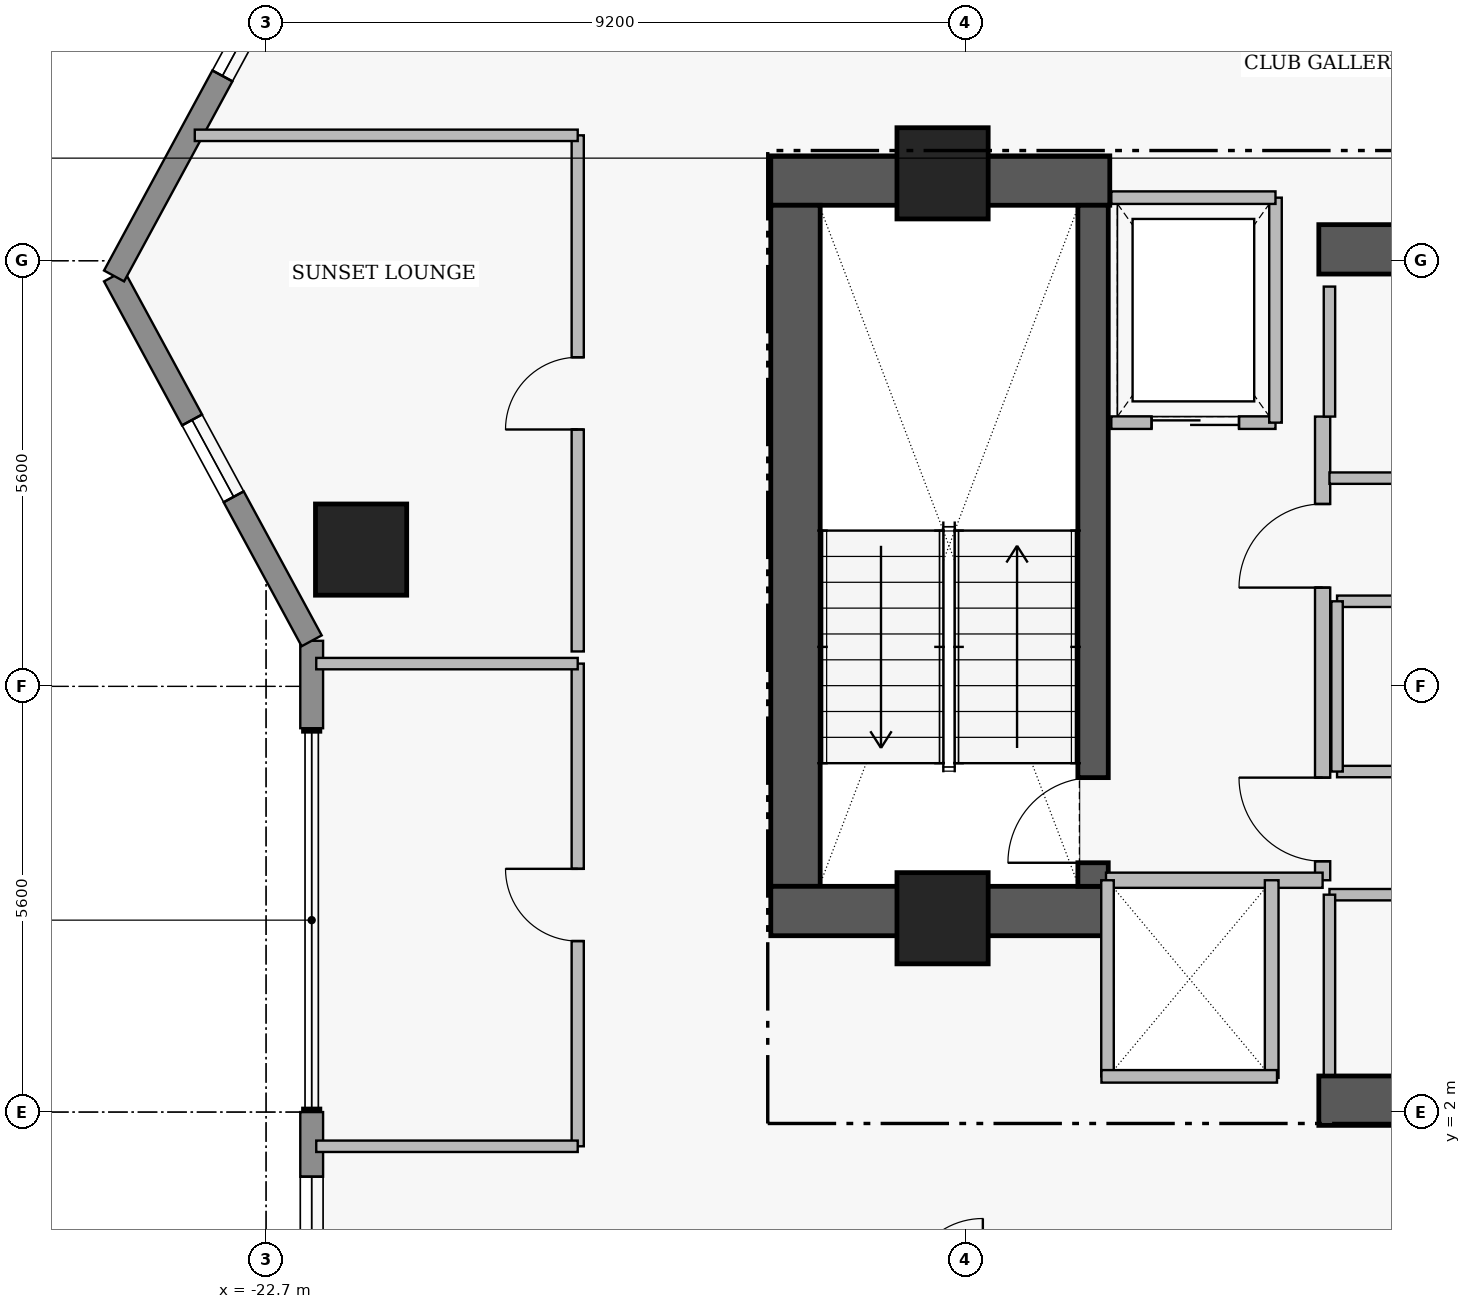
"""IFC4 building model, lengths in metres.
Left out: names, types, materials, properties, quantities, classifications, styles, units other than length and angle.
Written with IfcOpenShell. Run it as: python <this file> out.ifc"""

import sys

from ifc_helpers import new_model, si_unit, direction, frame, frame_2d, origin, origin_2d, place, context, subcontext, project, spatial, rectangle, extrude, element, fill, save


model = new_model("IFC4")
c1 = context("Model", 3, precision=1e-05, world=origin(), true_north=direction((0.0, 1.0)))
c2 = subcontext(c1, "Body", "Model", "MODEL_VIEW")
j1 = project(units=[si_unit("LENGTHUNIT", "METRE"), si_unit("PLANEANGLEUNIT", "RADIAN")], contexts=[c1])
p1 = place(None, origin())
s1 = spatial("IfcSite", under=j1, at=p1, CompositionType="ELEMENT")
p2 = place(p1, origin())
s2 = spatial("IfcBuilding", under=s1, at=p2, CompositionType="ELEMENT")
p3 = place(p2, frame((0.0, 0.0, 199.9)))
s3 = spatial("IfcBuildingStorey", under=s2, at=p3, CompositionType="ELEMENT", Elevation=199.9)
p4 = place(p3, frame((-16.06, 14.255, 0.0), z_axis=(0.0, 0.0, 1.0), x_axis=(1.0, 0.0, 0.0)))
e1 = element("IfcWall", 1, at=p4, inside=s3, PredefinedType="SHEAR", context=c2, shape_type="SweptSolid", body=[
    extrude(rectangle(XDim=4.46, YDim=0.65, at=frame_2d((2.23, 0.0))), origin(), (0.0, 0.0, 1.0), 3.56),
])
p5 = place(p3, frame((-15.735, 4.97, 0.0), z_axis=(0.0, 0.0, 1.0), x_axis=(0.0, 1.0, 0.0)))
e2 = element("IfcWall", 2, at=p5, inside=s3, PredefinedType="SHEAR", context=c2, shape_type="SweptSolid", body=[
    extrude(rectangle(XDim=8.96, YDim=0.65, at=frame_2d((4.48, 0.0))), origin(), (0.0, 0.0, 1.0), 3.56),
])
p6 = place(p3, frame((-16.06, 4.645, 0.0), z_axis=(0.0, 0.0, 1.0), x_axis=(1.0, 0.0, 0.0)))
e3 = element("IfcWall", 3, at=p6, inside=s3, PredefinedType="SHEAR", context=c2, shape_type="SweptSolid", body=[
    extrude(rectangle(XDim=4.46, YDim=0.65, at=frame_2d((2.23, 0.0))), origin(), (0.0, 0.0, 1.0), 3.56),
])
for number, where, z_axis, x_axis in (
    (4, (-8.85, 2.15, 0.0), (0.0, 0.0, 1.0), (1.0, 0.0, 0.0)),
    (5, (-8.85, 13.35, 0.0), (0.0, 0.0, 1.0), (1.0, 0.0, 0.0)),
):
    element("IfcWall", number, at=place(p3, frame(where, z_axis=z_axis, x_axis=x_axis)), inside=s3, PredefinedType="SHEAR", context=c2, shape_type="SweptSolid", body=[
        extrude(rectangle(XDim=7.6, YDim=0.65, at=frame_2d((3.8, 0.0))), origin(), (0.0, 0.0, 1.0), 3.53),
    ])
p7 = place(p3, frame((-11.82, 4.97, 0.0), z_axis=(0.0, 0.0, 1.0), x_axis=(0.0, 1.0, 0.0)))
e6 = element("IfcWall", 6, at=p7, inside=s3, PredefinedType="SHEAR", context=c2, shape_type="SweptSolid", body=[
    extrude(rectangle(XDim=8.96, YDim=0.4, at=frame_2d((4.48, 0.0))), origin(), (0.0, 0.0, 1.0), 3.56),
])
p8 = place(p7, frame((0.31, 0.0, 0.0)))
e7 = element("IfcOpeningElement", 7, at=p8, cuts=e6, PredefinedType="OPENING", context=c2, shape_type="SweptSolid", body=[
    extrude(rectangle(XDim=1.12, YDim=2.22, at=frame_2d((0.56, 1.11))), frame((0.0, 0.21, 0.0), z_axis=(0.0, -1.0, 0.0), x_axis=(1.0, 0.0, 0.0)), (0.0, 0.0, 1.0), 0.42),
])
for number, where, z_axis, x_axis in (
    (8, (-13.8, 14.35, 0.0), (0.0, 0.0, 1.0), (1.0, 0.0, 0.0)),
    (9, (-13.8, 4.55, 0.0), (0.0, 0.0, 1.0), (1.0, 0.0, 0.0)),
    (10, (-21.45, 9.4, 0.0), (0.0, 0.0, 1.0), (1.0, 0.0, 0.0)),
):
    element("IfcColumn", number, at=place(p3, frame(where, z_axis=z_axis, x_axis=x_axis)), inside=s3, PredefinedType="COLUMN", context=c2, shape_type="SweptSolid", body=[
        extrude(rectangle(XDim=1.2, YDim=1.2, at=origin_2d()), origin(), (0.0, 0.0, 1.0), 3.75),
    ])
p9 = place(p3, frame((-22.1, -4.2, 0.0), z_axis=(0.0, 0.0, 1.0), x_axis=(0.0, 1.0, 0.0)))
e11 = element("IfcWall", 11, at=p9, inside=s3, PredefinedType="STANDARD", context=c2, shape_type="SweptSolid", body=[
    extrude(rectangle(XDim=6.2, YDim=0.3, at=frame_2d((3.1, 0.0))), origin(), (0.0, 0.0, 1.0), 3.53),
])
p10 = place(p9, frame((2.045, 0.0, 0.95)))
e12 = element("IfcOpeningElement", 12, at=p10, cuts=e11, PredefinedType="OPENING", context=c2, shape_type="SweptSolid", body=[
    extrude(rectangle(XDim=1.15, YDim=1.55, at=frame_2d((0.575, 0.775))), frame((0.0, 0.16, 0.0), z_axis=(0.0, -1.0, 0.0), x_axis=(1.0, 0.0, 0.0)), (0.0, 0.0, 1.0), 0.32),
])
p11 = place(p9, frame((4.2, 0.0, 0.95)))
e13 = element("IfcOpeningElement", 13, at=p11, cuts=e11, PredefinedType="OPENING", context=c2, shape_type="SweptSolid", body=[
    extrude(rectangle(XDim=1.15, YDim=1.55, at=frame_2d((0.575, 0.775))), frame((0.0, 0.16, 0.0), z_axis=(0.0, -1.0, 0.0), x_axis=(1.0, 0.0, 0.0)), (0.0, 0.0, 1.0), 0.32),
])
p12 = place(p3, frame((-22.1, 7.05, 0.0), z_axis=(0.0, 0.0, 1.0), x_axis=(0.0, 1.0, 0.0)))
e14 = element("IfcWall", 14, at=p12, inside=s3, PredefinedType="STANDARD", context=c2, shape_type="SweptSolid", body=[
    extrude(rectangle(XDim=1.15, YDim=0.3, at=frame_2d((0.575, 0.0))), origin(), (0.0, 0.0, 1.0), 3.53),
])
p13 = place(p3, frame((-22.1, 8.2, 0.0), z_axis=(0.0, 0.0, 1.0), x_axis=(-0.476258655584, 0.879305233114, 0.0)))
e15 = element("IfcWall", 15, at=p13, inside=s3, PredefinedType="STANDARD", context=c2, shape_type="SweptSolid", body=[
    extrude(rectangle(XDim=5.459, YDim=0.3, at=frame_2d((2.729, 0.0))), origin(), (0.0, 0.0, 1.0), 3.53),
])
p14 = place(p13, frame((2.155, 0.0, 1.25)))
e16 = element("IfcOpeningElement", 16, at=p14, cuts=e15, PredefinedType="OPENING", context=c2, shape_type="SweptSolid", body=[
    extrude(rectangle(XDim=1.15, YDim=1.55, at=frame_2d((0.575, 0.775))), frame((0.0, 0.16, 0.0), z_axis=(0.0, -1.0, 0.0), x_axis=(1.0, 0.0, 0.0)), (0.0, 0.0, 1.0), 0.32),
])
p15 = place(p3, frame((-24.7, 13.0, 0.0), z_axis=(0.0, 0.0, 1.0), x_axis=(0.476258655584, 0.879305233114, 0.0)))
e17 = element("IfcWall", 17, at=p15, inside=s3, PredefinedType="STANDARD", context=c2, shape_type="SweptSolid", body=[
    extrude(rectangle(XDim=5.459, YDim=0.3, at=frame_2d((2.729, 0.0))), origin(), (0.0, 0.0, 1.0), 3.53),
])
p16 = place(p15, frame((2.993, 0.0, 1.25)))
e18 = element("IfcOpeningElement", 18, at=p16, cuts=e17, PredefinedType="OPENING", context=c2, shape_type="SweptSolid", body=[
    extrude(rectangle(XDim=1.15, YDim=1.55, at=frame_2d((0.575, 0.775))), frame((0.0, 0.16, 0.0), z_axis=(0.0, -1.0, 0.0), x_axis=(1.0, 0.0, 0.0)), (0.0, 0.0, 1.0), 0.32),
])
p17 = place(p3, frame((-8.8, 5.05, 0.0), z_axis=(0.0, 0.0, 1.0), x_axis=(0.0, 1.0, 0.0)))
e19 = element("IfcWall", 19, at=p17, inside=s3, PredefinedType="PARTITIONING", context=c2, shape_type="SweptSolid", body=[
    extrude(rectangle(XDim=6.1, YDim=0.2, at=frame_2d((3.05, 0.0))), origin(), (0.0, 0.0, 1.0), 3.53),
])
p18 = place(p17, frame((0.25, 0.0, 0.0)))
e20 = element("IfcOpeningElement", 20, at=p18, cuts=e19, PredefinedType="OPENING", context=c2, shape_type="SweptSolid", body=[
    extrude(rectangle(XDim=1.1, YDim=2.2, at=frame_2d((0.55, 1.1))), frame((0.0, 0.11, 0.0), z_axis=(0.0, -1.0, 0.0), x_axis=(1.0, 0.0, 0.0)), (0.0, 0.0, 1.0), 0.22),
])
p19 = place(p17, frame((3.85, 0.0, 0.0)))
e21 = element("IfcOpeningElement", 21, at=p19, cuts=e19, PredefinedType="OPENING", context=c2, shape_type="SweptSolid", body=[
    extrude(rectangle(XDim=1.1, YDim=2.2, at=frame_2d((0.55, 1.1))), frame((0.0, 0.11, 0.0), z_axis=(0.0, -1.0, 0.0), x_axis=(1.0, 0.0, 0.0)), (0.0, 0.0, 1.0), 0.22),
])
p20 = place(p3, frame((-11.58, 11.07, 0.0), z_axis=(0.0, 0.0, 1.0), x_axis=(1.0, 0.0, 0.0)))
e22 = element("IfcWall", 22, at=p20, inside=s3, PredefinedType="PARTITIONING", context=c2, shape_type="SweptSolid", body=[
    extrude(rectangle(XDim=2.16, YDim=0.165, at=frame_2d((1.08, 0.0))), origin(), (0.0, 0.0, 1.0), 3.53),
])
p21 = place(p20, frame((0.53, 0.0, 0.0)))
e23 = element("IfcOpeningElement", 23, at=p21, cuts=e22, PredefinedType="OPENING", context=c2, shape_type="SweptSolid", body=[
    extrude(rectangle(XDim=1.15, YDim=2.25, at=frame_2d((0.575, 1.125))), frame((0.0, 0.093, 0.0), z_axis=(0.0, -1.0, 0.0), x_axis=(1.0, 0.0, 0.0)), (0.0, 0.0, 1.0), 0.185),
])
p22 = place(p3, frame((-8.71, 4.86, 0.0), z_axis=(0.0, 0.0, 1.0), x_axis=(1.0, 0.0, 0.0)))
e24 = element("IfcWall", 24, at=p22, inside=s3, PredefinedType="PARTITIONING", context=c2, shape_type="SweptSolid", body=[
    extrude(rectangle(XDim=4.92, YDim=0.15, at=frame_2d((2.46, 0.0))), origin(), (0.0, 0.0, 1.0), 3.53),
])
p23 = place(p22, frame((2.01, 0.0, 0.0)))
e25 = element("IfcOpeningElement", 25, at=p23, cuts=e24, PredefinedType="OPENING", context=c2, shape_type="SweptSolid", body=[
    extrude(rectangle(XDim=0.9, YDim=2.15, at=frame_2d((0.45, 1.075))), frame((0.0, 0.085, 0.0), z_axis=(0.0, -1.0, 0.0), x_axis=(1.0, 0.0, 0.0)), (0.0, 0.0, 1.0), 0.17),
])
p24 = place(p3, frame((-8.71, 10.34, 0.0), z_axis=(0.0, 0.0, 1.0), x_axis=(1.0, 0.0, 0.0)))
e26 = element("IfcWall", 26, at=p24, inside=s3, PredefinedType="PARTITIONING", context=c2, shape_type="SweptSolid", body=[
    extrude(rectangle(XDim=4.52, YDim=0.15, at=frame_2d((2.26, 0.0))), origin(), (0.0, 0.0, 1.0), 3.53),
])
p25 = place(p24, frame((1.81, 0.0, 0.0)))
e27 = element("IfcOpeningElement", 27, at=p25, cuts=e26, PredefinedType="OPENING", context=c2, shape_type="SweptSolid", body=[
    extrude(rectangle(XDim=0.9, YDim=2.15, at=frame_2d((0.45, 1.075))), frame((0.0, 0.085, 0.0), z_axis=(0.0, -1.0, 0.0), x_axis=(1.0, 0.0, 0.0)), (0.0, 0.0, 1.0), 0.17),
])
p26 = place(p3, frame((-8.61, 6.48, 0.0), z_axis=(0.0, 0.0, 1.0), x_axis=(1.0, 0.0, 0.0)))
e28 = element("IfcWall", 28, at=p26, inside=s3, PredefinedType="PARTITIONING", context=c2, shape_type="SweptSolid", body=[
    extrude(rectangle(XDim=7.29, YDim=0.15, at=frame_2d((3.645, 0.0))), origin(), (0.0, 0.0, 1.0), 3.53),
])
p27 = place(p26, frame((3.195, 0.0, 0.0)))
e29 = element("IfcOpeningElement", 29, at=p27, cuts=e28, PredefinedType="OPENING", context=c2, shape_type="SweptSolid", body=[
    extrude(rectangle(XDim=0.9, YDim=2.15, at=frame_2d((0.45, 1.075))), frame((0.0, 0.085, 0.0), z_axis=(0.0, -1.0, 0.0), x_axis=(1.0, 0.0, 0.0)), (0.0, 0.0, 1.0), 0.17),
])
p28 = place(p3, frame((-18.6, 1.55, 0.0), z_axis=(0.0, 0.0, 1.0), x_axis=(0.0, 1.0, 0.0)))
e30 = element("IfcWall", 30, at=p28, inside=s3, PredefinedType="PARTITIONING", context=c2, shape_type="SweptSolid", body=[
    extrude(rectangle(XDim=6.35, YDim=0.16, at=frame_2d((3.175, 0.0))), origin(), (0.0, 0.0, 1.0), 3.53),
])
p29 = place(p28, frame((2.7, 0.0, 0.0)))
e31 = element("IfcOpeningElement", 31, at=p29, cuts=e30, PredefinedType="OPENING", context=c2, shape_type="SweptSolid", body=[
    extrude(rectangle(XDim=0.95, YDim=2.15, at=frame_2d((0.475, 1.075))), frame((0.0, 0.09, 0.0), z_axis=(0.0, -1.0, 0.0), x_axis=(1.0, 0.0, 0.0)), (0.0, 0.0, 1.0), 0.18),
])
p30 = place(p3, frame((-18.6, 8.06, 0.0), z_axis=(0.0, 0.0, 1.0), x_axis=(0.0, 1.0, 0.0)))
e32 = element("IfcWall", 32, at=p30, inside=s3, PredefinedType="PARTITIONING", context=c2, shape_type="SweptSolid", body=[
    extrude(rectangle(XDim=6.79, YDim=0.16, at=frame_2d((3.395, 0.0))), origin(), (0.0, 0.0, 1.0), 3.53),
])
p31 = place(p30, frame((2.92, 0.0, 0.0)))
e33 = element("IfcOpeningElement", 33, at=p31, cuts=e32, PredefinedType="OPENING", context=c2, shape_type="SweptSolid", body=[
    extrude(rectangle(XDim=0.95, YDim=2.15, at=frame_2d((0.475, 1.075))), frame((0.0, 0.09, 0.0), z_axis=(0.0, -1.0, 0.0), x_axis=(1.0, 0.0, 0.0)), (0.0, 0.0, 1.0), 0.18),
])
p32 = place(p3, frame((-11.65, 5.05, 0.0), z_axis=(0.0, 0.0, 1.0), x_axis=(1.0, 0.0, 0.0)))
e34 = element("IfcWall", 34, at=p32, inside=s3, PredefinedType="PARTITIONING", context=c2, shape_type="SweptSolid", body=[
    extrude(rectangle(XDim=2.85, YDim=0.2, at=frame_2d((1.425, 0.0))), origin(), (0.0, 0.0, 1.0), 3.53),
])
p33 = place(p3, frame((-9.42, 11.07, 0.0), z_axis=(0.0, 0.0, 1.0), x_axis=(0.0, 1.0, 0.0)))
e35 = element("IfcWall", 35, at=p33, inside=s3, PredefinedType="PARTITIONING", context=c2, shape_type="SweptSolid", body=[
    extrude(rectangle(XDim=2.96, YDim=0.165, at=frame_2d((1.48, 0.0))), origin(), (0.0, 0.0, 1.0), 3.53),
])
p34 = place(p3, frame((-11.58, 14.03, 0.0), z_axis=(0.0, 0.0, 1.0), x_axis=(1.0, 0.0, 0.0)))
e36 = element("IfcWall", 36, at=p34, inside=s3, PredefinedType="PARTITIONING", context=c2, shape_type="SweptSolid", body=[
    extrude(rectangle(XDim=2.16, YDim=0.165, at=frame_2d((1.08, 0.0))), origin(), (0.0, 0.0, 1.0), 3.53),
])
p35 = place(p3, frame((-8.71, 2.49, 0.0), z_axis=(0.0, 0.0, 1.0), x_axis=(0.0, 1.0, 0.0)))
e37 = element("IfcWall", 37, at=p35, inside=s3, PredefinedType="PARTITIONING", context=c2, shape_type="SweptSolid", body=[
    extrude(rectangle(XDim=2.37, YDim=0.15, at=frame_2d((1.185, 0.0))), origin(), (0.0, 0.0, 1.0), 3.53),
])
p36 = place(p3, frame((-8.71, 11.15, 0.0), z_axis=(0.0, 0.0, 1.0), x_axis=(0.0, 1.0, 0.0)))
e38 = element("IfcWall", 38, at=p36, inside=s3, PredefinedType="PARTITIONING", context=c2, shape_type="SweptSolid", body=[
    extrude(rectangle(XDim=1.71, YDim=0.15, at=frame_2d((0.855, 0.0))), origin(), (0.0, 0.0, 1.0), 3.53),
])
p37 = place(p3, frame((-9.47, 2.45, 0.0), z_axis=(0.0, 0.0, 1.0), x_axis=(0.0, 1.0, 0.0)))
e39 = element("IfcWall", 39, at=p37, inside=s3, PredefinedType="PARTITIONING", context=c2, shape_type="SweptSolid", body=[
    extrude(rectangle(XDim=2.6, YDim=0.18, at=frame_2d((1.3, 0.0))), origin(), (0.0, 0.0, 1.0), 3.53),
])
p38 = place(p3, frame((-11.63, 2.47, 0.0), z_axis=(0.0, 0.0, 1.0), x_axis=(0.0, 1.0, 0.0)))
e40 = element("IfcWall", 40, at=p38, inside=s3, PredefinedType="PARTITIONING", context=c2, shape_type="SweptSolid", body=[
    extrude(rectangle(XDim=2.58, YDim=0.165, at=frame_2d((1.29, 0.0))), origin(), (0.0, 0.0, 1.0), 3.53),
])
p39 = place(p3, frame((-11.71, 2.47, 0.0), z_axis=(0.0, 0.0, 1.0), x_axis=(1.0, 0.0, 0.0)))
e41 = element("IfcWall", 41, at=p39, inside=s3, PredefinedType="PARTITIONING", context=c2, shape_type="SweptSolid", body=[
    extrude(rectangle(XDim=2.31, YDim=0.165, at=frame_2d((1.155, 0.0))), origin(), (0.0, 0.0, 1.0), 2.43),
])
p40 = place(p3, frame((-8.61, 8.72, 0.0), z_axis=(0.0, 0.0, 1.0), x_axis=(1.0, 0.0, 0.0)))
e42 = element("IfcWall", 42, at=p40, inside=s3, PredefinedType="PARTITIONING", context=c2, shape_type="SweptSolid", body=[
    extrude(rectangle(XDim=7.29, YDim=0.15, at=frame_2d((3.645, 0.0))), origin(), (0.0, 0.0, 1.0), 3.53),
])
p41 = place(p3, frame((-8.61, 6.48, 0.0), z_axis=(0.0, 0.0, 1.0), x_axis=(0.0, 1.0, 0.0)))
e43 = element("IfcWall", 43, at=p41, inside=s3, PredefinedType="PARTITIONING", context=c2, shape_type="SweptSolid", body=[
    extrude(rectangle(XDim=2.24, YDim=0.15, at=frame_2d((1.12, 0.0))), origin(), (0.0, 0.0, 1.0), 3.53),
])
for number, where, z_axis, x_axis in (
    (44, (-22.04, 1.55, 0.0), (0.0, 0.0, 1.0), (1.0, 0.0, 0.0)),
    (45, (-22.04, 7.9, 0.0), (0.0, 0.0, 1.0), (1.0, 0.0, 0.0)),
):
    element("IfcWall", number, at=place(p3, frame(where, z_axis=z_axis, x_axis=x_axis)), inside=s3, PredefinedType="PARTITIONING", context=c2, shape_type="SweptSolid", body=[
        extrude(rectangle(XDim=3.44, YDim=0.15, at=frame_2d((1.72, 0.0))), origin(), (0.0, 0.0, 1.0), 3.53),
    ])
p42 = place(p3, frame((-23.638, 14.85, 0.0), z_axis=(0.0, 0.0, 1.0), x_axis=(1.0, 0.0, 0.0)))
e46 = element("IfcWall", 46, at=p42, inside=s3, PredefinedType="PARTITIONING", context=c2, shape_type="SweptSolid", body=[
    extrude(rectangle(XDim=5.038, YDim=0.15, at=frame_2d((2.519, 0.0))), origin(), (0.0, 0.0, 1.0), 3.53),
])
p43 = place(p11, origin())
e47 = element("IfcWindow", 47, at=p43, inside=s3, PartitioningType="SINGLE_PANEL", PredefinedType="WINDOW", context=c2, shape_type="SweptSolid", body=[
    extrude(rectangle(XDim=1.15, YDim=1.55, at=frame_2d((0.575, 0.775))), frame((0.0, 0.03, 0.0), z_axis=(0.0, -1.0, 0.0), x_axis=(1.0, 0.0, 0.0)), (0.0, 0.0, 1.0), 0.06),
])
fill(e13, e47)
p44 = place(p14, origin())
e48 = element("IfcWindow", 48, at=p44, inside=s3, PartitioningType="SINGLE_PANEL", PredefinedType="WINDOW", context=c2, shape_type="SweptSolid", body=[
    extrude(rectangle(XDim=1.15, YDim=1.55, at=frame_2d((0.575, 0.775))), frame((0.0, 0.03, 0.0), z_axis=(0.0, -1.0, 0.0), x_axis=(1.0, 0.0, 0.0)), (0.0, 0.0, 1.0), 0.06),
])
fill(e16, e48)
p45 = place(p16, origin())
e49 = element("IfcWindow", 49, at=p45, inside=s3, PartitioningType="SINGLE_PANEL", PredefinedType="WINDOW", context=c2, shape_type="SweptSolid", body=[
    extrude(rectangle(XDim=1.15, YDim=1.55, at=frame_2d((0.575, 0.775))), frame((0.0, 0.03, 0.0), z_axis=(0.0, -1.0, 0.0), x_axis=(1.0, 0.0, 0.0)), (0.0, 0.0, 1.0), 0.06),
])
fill(e18, e49)
p46 = place(p8, origin())
e50 = element("IfcDoor", 50, at=p46, inside=s3, OperationType="SINGLE_SWING_LEFT", PredefinedType="DOOR", context=c2, shape_type="SweptSolid", body=[
    extrude(rectangle(XDim=1.12, YDim=2.22, at=frame_2d((0.56, 1.11))), frame((0.0, 0.025, 0.0), z_axis=(0.0, -1.0, 0.0), x_axis=(1.0, 0.0, 0.0)), (0.0, 0.0, 1.0), 0.05),
])
fill(e7, e50)
p47 = place(p18, origin())
e51 = element("IfcDoor", 51, at=p47, inside=s3, OperationType="SINGLE_SWING_RIGHT", PredefinedType="DOOR", context=c2, shape_type="SweptSolid", body=[
    extrude(rectangle(XDim=1.1, YDim=2.2, at=frame_2d((0.55, 1.1))), frame((0.0, 0.025, 0.0), z_axis=(0.0, -1.0, 0.0), x_axis=(1.0, 0.0, 0.0)), (0.0, 0.0, 1.0), 0.05),
])
fill(e20, e51)
p48 = place(p19, origin())
e52 = element("IfcDoor", 52, at=p48, inside=s3, OperationType="SINGLE_SWING_LEFT", PredefinedType="DOOR", context=c2, shape_type="SweptSolid", body=[
    extrude(rectangle(XDim=1.1, YDim=2.2, at=frame_2d((0.55, 1.1))), frame((0.0, 0.025, 0.0), z_axis=(0.0, -1.0, 0.0), x_axis=(1.0, 0.0, 0.0)), (0.0, 0.0, 1.0), 0.05),
])
fill(e21, e52)
p49 = place(p21, origin())
e53 = element("IfcDoor", 53, at=p49, inside=s3, OperationType="SLIDING_TO_LEFT", PredefinedType="DOOR", context=c2, shape_type="SweptSolid", body=[
    extrude(rectangle(XDim=1.15, YDim=2.25, at=frame_2d((0.575, 1.125))), frame((0.0, 0.025, 0.0), z_axis=(0.0, -1.0, 0.0), x_axis=(1.0, 0.0, 0.0)), (0.0, 0.0, 1.0), 0.05),
])
fill(e23, e53)
p50 = place(p29, origin())
e54 = element("IfcDoor", 54, at=p50, inside=s3, OperationType="SINGLE_SWING_RIGHT", PredefinedType="DOOR", context=c2, shape_type="SweptSolid", body=[
    extrude(rectangle(XDim=0.95, YDim=2.15, at=frame_2d((0.475, 1.075))), frame((0.0, 0.025, 0.0), z_axis=(0.0, -1.0, 0.0), x_axis=(1.0, 0.0, 0.0)), (0.0, 0.0, 1.0), 0.05),
])
fill(e31, e54)
p51 = place(p31, origin())
e55 = element("IfcDoor", 55, at=p51, inside=s3, OperationType="SINGLE_SWING_LEFT", PredefinedType="DOOR", context=c2, shape_type="SweptSolid", body=[
    extrude(rectangle(XDim=0.95, YDim=2.15, at=frame_2d((0.475, 1.075))), frame((0.0, 0.025, 0.0), z_axis=(0.0, -1.0, 0.0), x_axis=(1.0, 0.0, 0.0)), (0.0, 0.0, 1.0), 0.05),
])
fill(e33, e55)
save(model, sys.argv[1])
